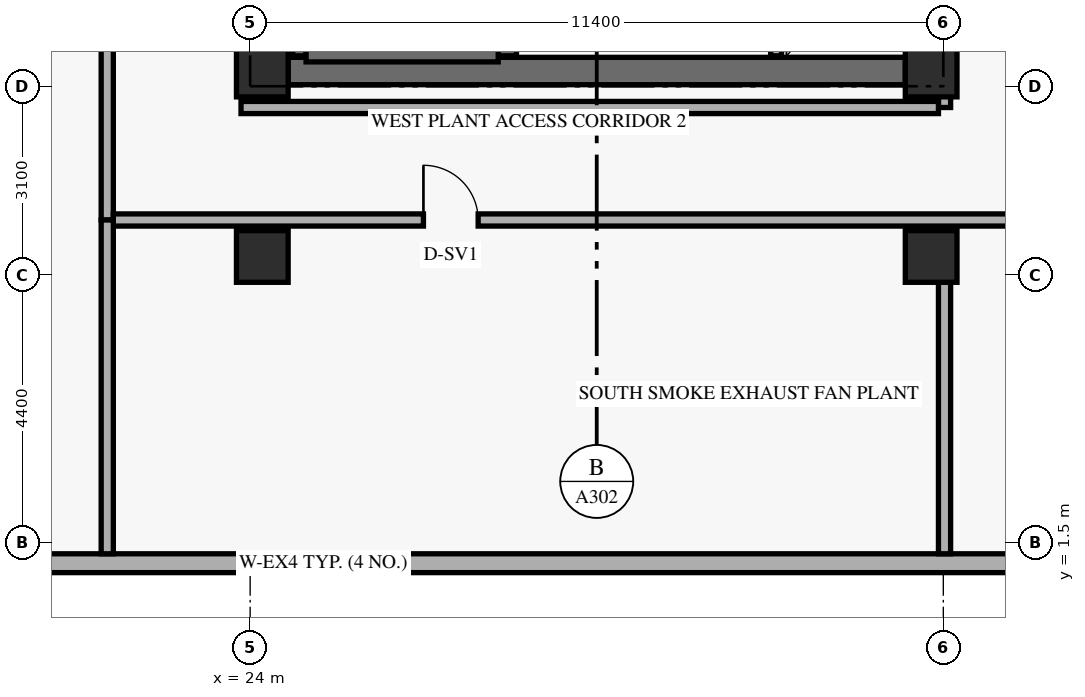
"""IFC4 building model, lengths in metres.
Left out: names, types, materials, properties, quantities, classifications, styles, units other than length and angle.
Written with IfcOpenShell. Run it as: python <this file> out.ifc"""

import sys

from ifc_helpers import new_model, si_unit, direction, frame, frame_2d, origin, origin_2d, place, context, subcontext, project, spatial, rectangle, extrude, element, fill, save


model = new_model("IFC4")
c1 = context("Model", 3, precision=1e-05, world=origin(), true_north=direction((0.0, 1.0)))
c2 = subcontext(c1, "Body", "Model", "MODEL_VIEW")
j1 = project(units=[si_unit("LENGTHUNIT", "METRE"), si_unit("PLANEANGLEUNIT", "RADIAN")], contexts=[c1])
p1 = place(None, origin())
s1 = spatial("IfcSite", under=j1, at=p1, CompositionType="ELEMENT")
p2 = place(p1, origin())
s2 = spatial("IfcBuilding", under=s1, at=p2, CompositionType="ELEMENT")
p3 = place(p2, frame((0.0, 0.0, 71.4)))
s3 = spatial("IfcBuildingStorey", under=s2, at=p3, CompositionType="ELEMENT", Elevation=71.4)
p4 = place(p3, frame((24.625, 9.25, 0.0), z_axis=(0.0, 0.0, 1.0), x_axis=(1.0, 0.0, 0.0)))
e1 = element("IfcWall", 1, at=p4, inside=s3, PredefinedType="SHEAR", context=c2, shape_type="SweptSolid", body=[
    extrude(rectangle(XDim=10.15, YDim=0.45, at=frame_2d((5.075, 0.0))), origin(), (0.0, 0.0, 1.0), 4.99),
])
p5 = place(p3, frame((24.81, 9.5, 0.0), z_axis=(0.0, 0.0, 1.0), x_axis=(0.0, 1.0, 0.0)))
e2 = element("IfcWall", 2, at=p5, inside=s3, PredefinedType="SHEAR", context=c2, shape_type="SweptSolid", body=[
    extrude(rectangle(XDim=7.76, YDim=0.22, at=frame_2d((3.88, 0.0))), origin(), (0.0, 0.0, 1.0), 4.99),
])
p6 = place(p3, frame((28.23, 9.5, 0.0), z_axis=(0.0, 0.0, 1.0), x_axis=(0.0, 1.0, 0.0)))
e3 = element("IfcWall", 3, at=p6, inside=s3, PredefinedType="SHEAR", context=c2, shape_type="SweptSolid", body=[
    extrude(rectangle(XDim=7.76, YDim=0.3, at=frame_2d((3.88, 0.0))), origin(), (0.0, 0.0, 1.0), 4.99),
])
p7 = place(p3, frame((24.92, 9.51, 0.0), z_axis=(0.0, 0.0, 1.0), x_axis=(1.0, 0.0, 0.0)))
e4 = element("IfcWall", 4, at=p7, inside=s3, PredefinedType="SHEAR", context=c2, shape_type="SweptSolid", body=[
    extrude(rectangle(XDim=3.16, YDim=0.22, at=frame_2d((1.58, 0.0))), origin(), (0.0, 0.0, 1.0), 4.99),
])
for number, where, z_axis, x_axis in (
    (5, (24.2, 6.2, 0.0), (0.0, 0.0, 1.0), (1.0, 0.0, 0.0)),
    (6, (24.2, 9.25, 0.0), (0.0, 0.0, 1.0), (1.0, 0.0, 0.0)),
    (7, (35.2, 6.2, 0.0), (0.0, 0.0, 1.0), (1.0, 0.0, 0.0)),
    (8, (35.2, 9.25, 0.0), (0.0, 0.0, 1.0), (1.0, 0.0, 0.0)),
):
    element("IfcColumn", number, at=place(p3, frame(where, z_axis=z_axis, x_axis=x_axis)), inside=s3, PredefinedType="COLUMN", context=c2, shape_type="SweptSolid", body=[
        extrude(rectangle(XDim=0.85, YDim=0.85, at=origin_2d()), origin(), (0.0, 0.0, 1.0), 5.4),
    ])
p8 = place(p3, frame((5.42, 1.155, 0.0), z_axis=(0.0, 0.0, 1.0), x_axis=(1.0, 0.0, 0.0)))
e9 = element("IfcWall", 9, at=p8, inside=s3, PredefinedType="SOLIDWALL", context=c2, shape_type="SweptSolid", body=[
    extrude(rectangle(XDim=39.56, YDim=0.31, at=frame_2d((19.78, 0.0))), origin(), (0.0, 0.0, 1.0), 4.99),
])
p9 = place(p3, frame((32.65, 9.5, 0.0), z_axis=(0.0, 0.0, 1.0), x_axis=(0.0, 1.0, 0.0)))
e10 = element("IfcWall", 10, at=p9, inside=s3, PredefinedType="STANDARD", context=c2, shape_type="SweptSolid", body=[
    extrude(rectangle(XDim=6.08, YDim=0.18, at=frame_2d((3.04, 0.0))), origin(), (0.0, 0.0, 1.0), 4.99),
])
p10 = place(p9, frame((0.55, 0.0, 0.0)))
e11 = element("IfcOpeningElement", 11, at=p10, cuts=e10, PredefinedType="OPENING", context=c2, shape_type="SweptSolid", body=[
    extrude(rectangle(XDim=1.05, YDim=2.2, at=frame_2d((0.525, 1.1))), frame((0.0, 0.1, 0.0), z_axis=(0.0, -1.0, 0.0), x_axis=(1.0, 0.0, 0.0)), (0.0, 0.0, 1.0), 0.2),
])
p11 = place(p9, frame((2.55, 0.0, 0.0)))
e12 = element("IfcOpeningElement", 12, at=p11, cuts=e10, PredefinedType="OPENING", context=c2, shape_type="SweptSolid", body=[
    extrude(rectangle(XDim=1.05, YDim=2.2, at=frame_2d((0.525, 1.1))), frame((0.0, 0.1, 0.0), z_axis=(0.0, -1.0, 0.0), x_axis=(1.0, 0.0, 0.0)), (0.0, 0.0, 1.0), 0.2),
])
p12 = place(p9, frame((4.55, 0.0, 0.0)))
e13 = element("IfcOpeningElement", 13, at=p12, cuts=e10, PredefinedType="OPENING", context=c2, shape_type="SweptSolid", body=[
    extrude(rectangle(XDim=1.05, YDim=2.2, at=frame_2d((0.525, 1.1))), frame((0.0, 0.1, 0.0), z_axis=(0.0, -1.0, 0.0), x_axis=(1.0, 0.0, 0.0)), (0.0, 0.0, 1.0), 0.2),
])
p13 = place(p3, frame((35.42, 1.31, 0.0), z_axis=(0.0, 0.0, 1.0), x_axis=(0.0, 1.0, 0.0)))
e14 = element("IfcWall", 14, at=p13, inside=s3, PredefinedType="STANDARD", context=c2, shape_type="SweptSolid", body=[
    extrude(rectangle(XDim=5.49, YDim=0.2, at=frame_2d((2.745, 0.0))), origin(), (0.0, 0.0, 1.0), 4.279),
])
p14 = place(p3, frame((35.42, 8.65, 0.0), z_axis=(0.0, 0.0, 1.0), x_axis=(0.0, 1.0, 0.0)))
e15 = element("IfcWall", 15, at=p14, inside=s3, PredefinedType="STANDARD", context=c2, shape_type="SweptSolid", body=[
    extrude(rectangle(XDim=0.6, YDim=0.2, at=frame_2d((0.3, 0.0))), origin(), (0.0, 0.0, 1.0), 4.279),
])
p15 = place(p3, frame((21.65, 6.8, 0.0), z_axis=(0.0, 0.0, 1.0), x_axis=(0.0, 1.0, 0.0)))
e16 = element("IfcWall", 16, at=p15, inside=s3, PredefinedType="STANDARD", context=c2, shape_type="SweptSolid", body=[
    extrude(rectangle(XDim=34.4, YDim=0.2, at=frame_2d((17.2, 0.0))), origin(), (0.0, 0.0, 1.0), 4.279),
])
p16 = place(p15, frame((7.0, 0.0, 0.0)))
e17 = element("IfcOpeningElement", 17, at=p16, cuts=e16, PredefinedType="OPENING", context=c2, shape_type="SweptSolid", body=[
    extrude(rectangle(XDim=1.05, YDim=2.15, at=frame_2d((0.525, 1.075))), frame((0.0, 0.11, 0.0), z_axis=(0.0, -1.0, 0.0), x_axis=(1.0, 0.0, 0.0)), (0.0, 0.0, 1.0), 0.22),
])
p17 = place(p15, frame((21.0, 0.0, 0.0)))
e18 = element("IfcOpeningElement", 18, at=p17, cuts=e16, PredefinedType="OPENING", context=c2, shape_type="SweptSolid", body=[
    extrude(rectangle(XDim=1.05, YDim=2.15, at=frame_2d((0.525, 1.075))), frame((0.0, 0.11, 0.0), z_axis=(0.0, -1.0, 0.0), x_axis=(1.0, 0.0, 0.0)), (0.0, 0.0, 1.0), 0.22),
])
p18 = place(p3, frame((21.75, 6.8, 0.0), z_axis=(0.0, 0.0, 1.0), x_axis=(1.0, 0.0, 0.0)))
e19 = element("IfcWall", 19, at=p18, inside=s3, PredefinedType="STANDARD", context=c2, shape_type="SweptSolid", body=[
    extrude(rectangle(XDim=15.6, YDim=0.2, at=frame_2d((7.8, 0.0))), origin(), (0.0, 0.0, 1.0), 4.279),
])
p19 = place(p18, frame((5.1, 0.0, 0.0)))
e20 = element("IfcOpeningElement", 20, at=p19, cuts=e19, PredefinedType="OPENING", context=c2, shape_type="SweptSolid", body=[
    extrude(rectangle(XDim=0.9, YDim=2.1, at=frame_2d((0.45, 1.05))), frame((0.0, 0.11, 0.0), z_axis=(0.0, -1.0, 0.0), x_axis=(1.0, 0.0, 0.0)), (0.0, 0.0, 1.0), 0.22),
])
p20 = place(p3, frame((23.85, 8.65, 0.0), z_axis=(0.0, 0.0, 1.0), x_axis=(1.0, 0.0, 0.0)))
e21 = element("IfcWall", 21, at=p20, inside=s3, PredefinedType="STANDARD", context=c2, shape_type="SweptSolid", body=[
    extrude(rectangle(XDim=11.47, YDim=0.2, at=frame_2d((5.735, 0.0))), origin(), (0.0, 0.0, 1.0), 4.279),
])
p21 = place(p3, frame((21.65, 1.31, 0.0), z_axis=(0.0, 0.0, 1.0), x_axis=(0.0, 1.0, 0.0)))
e22 = element("IfcWall", 22, at=p21, inside=s3, PredefinedType="STANDARD", context=c2, shape_type="SweptSolid", body=[
    extrude(rectangle(XDim=5.49, YDim=0.2, at=frame_2d((2.745, 0.0))), origin(), (0.0, 0.0, 1.0), 4.439),
])
p22 = place(p19, origin())
e23 = element("IfcDoor", 23, at=p22, inside=s3, OperationType="SINGLE_SWING_LEFT", PredefinedType="DOOR", context=c2, shape_type="SweptSolid", body=[
    extrude(rectangle(XDim=0.9, YDim=2.1, at=frame_2d((0.45, 1.05))), frame((0.0, 0.025, 0.0), z_axis=(0.0, -1.0, 0.0), x_axis=(1.0, 0.0, 0.0)), (0.0, 0.0, 1.0), 0.05),
])
fill(e20, e23)
save(model, sys.argv[1])
